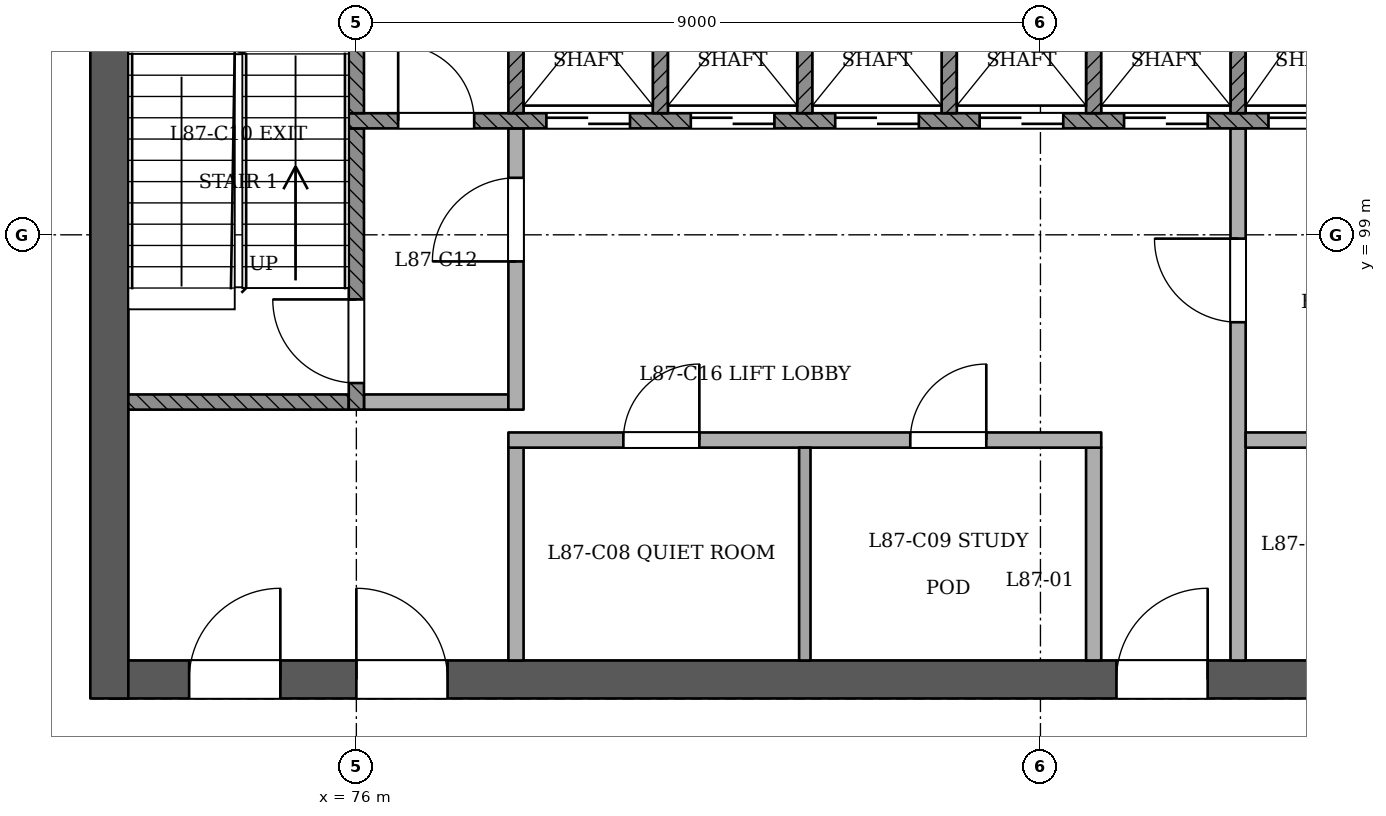
"""IFC4 building model, lengths in metres.
Left out: names, types, materials, properties, quantities, classifications, styles, units other than length and angle.
Written with IfcOpenShell. Run it as: python <this file> out.ifc"""

import sys

from ifc_helpers import new_model, si_unit, direction, frame, frame_2d, origin, place, context, subcontext, project, spatial, rectangle, extrude, element, fill, save


model = new_model("IFC4")
c1 = context("Model", 3, precision=1e-05, world=origin(), true_north=direction((0.0, 1.0)))
c2 = subcontext(c1, "Body", "Model", "MODEL_VIEW")
j1 = project(units=[si_unit("LENGTHUNIT", "METRE"), si_unit("PLANEANGLEUNIT", "RADIAN")], contexts=[c1])
p1 = place(None, origin())
s1 = spatial("IfcSite", under=j1, at=p1, CompositionType="ELEMENT")
p2 = place(p1, origin())
s2 = spatial("IfcBuilding", under=s1, at=p2, CompositionType="ELEMENT")
p3 = place(p2, frame((0.0, 0.0, 334.6)))
s3 = spatial("IfcBuildingStorey", under=s2, at=p3, CompositionType="ELEMENT", Elevation=334.6)
p4 = place(p3, frame((72.75, 93.15, 0.0), z_axis=(0.0, 0.0, 1.0), x_axis=(1.0, 0.0, 0.0)))
e1 = element("IfcWall", 1, at=p4, inside=s3, PredefinedType="SHEAR", context=c2, shape_type="SweptSolid", body=[
    extrude(rectangle(XDim=24.75, YDim=0.5, at=frame_2d((12.375, 0.0))), origin(), (0.0, 0.0, 1.0), 4.2),
])
p5 = place(p4, frame((1.05, 0.0, 0.0)))
e2 = element("IfcOpeningElement", 2, at=p5, cuts=e1, PredefinedType="OPENING", context=c2, shape_type="SweptSolid", body=[
    extrude(rectangle(XDim=1.2, YDim=2.1, at=frame_2d((0.6, 1.05))), frame((0.0, 0.26, 0.0), z_axis=(0.0, -1.0, 0.0), x_axis=(1.0, 0.0, 0.0)), (0.0, 0.0, 1.0), 0.521),
])
p6 = place(p4, frame((3.25, 0.0, 0.0)))
e3 = element("IfcOpeningElement", 3, at=p6, cuts=e1, PredefinedType="OPENING", context=c2, shape_type="SweptSolid", body=[
    extrude(rectangle(XDim=1.2, YDim=2.1, at=frame_2d((0.6, 1.05))), frame((0.0, 0.26, 0.0), z_axis=(0.0, -1.0, 0.0), x_axis=(1.0, 0.0, 0.0)), (0.0, 0.0, 1.0), 0.521),
])
p7 = place(p4, frame((13.25, 0.0, 0.0)))
e4 = element("IfcOpeningElement", 4, at=p7, cuts=e1, PredefinedType="OPENING", context=c2, shape_type="SweptSolid", body=[
    extrude(rectangle(XDim=1.2, YDim=2.1, at=frame_2d((0.6, 1.05))), frame((0.0, 0.26, 0.0), z_axis=(0.0, -1.0, 0.0), x_axis=(1.0, 0.0, 0.0)), (0.0, 0.0, 1.0), 0.521),
])
p8 = place(p4, frame((16.113, 0.0, 0.0)))
e5 = element("IfcOpeningElement", 5, at=p8, cuts=e1, PredefinedType="OPENING", context=c2, shape_type="SweptSolid", body=[
    extrude(rectangle(XDim=1.0, YDim=2.1, at=frame_2d((0.5, 1.05))), frame((0.0, 0.26, 0.0), z_axis=(0.0, -1.0, 0.0), x_axis=(1.0, 0.0, 0.0)), (0.0, 0.0, 1.0), 0.521),
])
p9 = place(p4, frame((19.55, 0.0, 0.0)))
e6 = element("IfcOpeningElement", 6, at=p9, cuts=e1, PredefinedType="OPENING", context=c2, shape_type="SweptSolid", body=[
    extrude(rectangle(XDim=1.0, YDim=2.1, at=frame_2d((0.5, 1.05))), frame((0.0, 0.26, 0.0), z_axis=(0.0, -1.0, 0.0), x_axis=(1.0, 0.0, 0.0)), (0.0, 0.0, 1.0), 0.521),
])
p10 = place(p4, frame((22.538, 0.0, 0.0)))
e7 = element("IfcOpeningElement", 7, at=p10, cuts=e1, PredefinedType="OPENING", context=c2, shape_type="SweptSolid", body=[
    extrude(rectangle(XDim=1.0, YDim=2.1, at=frame_2d((0.5, 1.05))), frame((0.0, 0.26, 0.0), z_axis=(0.0, -1.0, 0.0), x_axis=(1.0, 0.0, 0.0)), (0.0, 0.0, 1.0), 0.521),
])
p11 = place(p3, frame((72.75, 103.65, 0.0), z_axis=(0.0, 0.0, 1.0), x_axis=(0.0, -1.0, 0.0)))
e8 = element("IfcWall", 8, at=p11, inside=s3, PredefinedType="SHEAR", context=c2, shape_type="SweptSolid", body=[
    extrude(rectangle(XDim=10.75, YDim=0.5, at=frame_2d((5.375, 0.0))), origin(), (0.0, 0.0, 1.0), 4.2),
])
p12 = place(p3, frame((78.1, 93.4, 0.0), z_axis=(0.0, 0.0, 1.0), x_axis=(0.0, 1.0, 0.0)))
e9 = element("IfcWall", 9, at=p12, inside=s3, PredefinedType="PARTITIONING", context=c2, shape_type="SweptSolid", body=[
    extrude(rectangle(XDim=2.8, YDim=0.2, at=frame_2d((1.4, 0.0))), origin(), (0.0, 0.0, 1.0), 3.9),
])
p13 = place(p3, frame((81.9, 93.4, 0.0), z_axis=(0.0, 0.0, 1.0), x_axis=(0.0, 1.0, 0.0)))
e10 = element("IfcWall", 10, at=p13, inside=s3, PredefinedType="PARTITIONING", context=c2, shape_type="SweptSolid", body=[
    extrude(rectangle(XDim=2.8, YDim=0.15, at=frame_2d((1.4, 0.0))), origin(), (0.0, 0.0, 1.0), 3.9),
])
p14 = place(p3, frame((85.7, 93.4, 0.0), z_axis=(0.0, 0.0, 1.0), x_axis=(0.0, 1.0, 0.0)))
e11 = element("IfcWall", 11, at=p14, inside=s3, PredefinedType="PARTITIONING", context=c2, shape_type="SweptSolid", body=[
    extrude(rectangle(XDim=2.8, YDim=0.2, at=frame_2d((1.4, 0.0))), origin(), (0.0, 0.0, 1.0), 3.9),
])
p15 = place(p3, frame((87.6, 93.4, 0.0), z_axis=(0.0, 0.0, 1.0), x_axis=(0.0, 1.0, 0.0)))
e12 = element("IfcWall", 12, at=p15, inside=s3, PredefinedType="PARTITIONING", context=c2, shape_type="SweptSolid", body=[
    extrude(rectangle(XDim=7.0, YDim=0.2, at=frame_2d((3.5, 0.0))), origin(), (0.0, 0.0, 1.0), 3.9),
])
p16 = place(p15, frame((4.45, 0.0, 0.0)))
e13 = element("IfcOpeningElement", 13, at=p16, cuts=e12, PredefinedType="OPENING", context=c2, shape_type="SweptSolid", body=[
    extrude(rectangle(XDim=1.1, YDim=2.1, at=frame_2d((0.55, 1.05))), frame((0.0, 0.11, 0.0), z_axis=(0.0, -1.0, 0.0), x_axis=(1.0, 0.0, 0.0)), (0.0, 0.0, 1.0), 0.221),
])
p17 = place(p3, frame((78.0, 96.3, 0.0), z_axis=(0.0, 0.0, 1.0), x_axis=(1.0, 0.0, 0.0)))
e14 = element("IfcWall", 14, at=p17, inside=s3, PredefinedType="PARTITIONING", context=c2, shape_type="SweptSolid", body=[
    extrude(rectangle(XDim=7.8, YDim=0.2, at=frame_2d((3.9, 0.0))), origin(), (0.0, 0.0, 1.0), 3.9),
])
p18 = place(p17, frame((1.512, 0.0, 0.0)))
e15 = element("IfcOpeningElement", 15, at=p18, cuts=e14, PredefinedType="OPENING", context=c2, shape_type="SweptSolid", body=[
    extrude(rectangle(XDim=1.0, YDim=2.1, at=frame_2d((0.5, 1.05))), frame((0.0, 0.11, 0.0), z_axis=(0.0, -1.0, 0.0), x_axis=(1.0, 0.0, 0.0)), (0.0, 0.0, 1.0), 0.221),
])
p19 = place(p17, frame((5.288, 0.0, 0.0)))
e16 = element("IfcOpeningElement", 16, at=p19, cuts=e14, PredefinedType="OPENING", context=c2, shape_type="SweptSolid", body=[
    extrude(rectangle(XDim=1.0, YDim=2.1, at=frame_2d((0.5, 1.05))), frame((0.0, 0.11, 0.0), z_axis=(0.0, -1.0, 0.0), x_axis=(1.0, 0.0, 0.0)), (0.0, 0.0, 1.0), 0.221),
])
p20 = place(p3, frame((87.7, 96.3, 0.0), z_axis=(0.0, 0.0, 1.0), x_axis=(1.0, 0.0, 0.0)))
e17 = element("IfcWall", 17, at=p20, inside=s3, PredefinedType="PARTITIONING", context=c2, shape_type="SweptSolid", body=[
    extrude(rectangle(XDim=3.6, YDim=0.2, at=frame_2d((1.8, 0.0))), origin(), (0.0, 0.0, 1.0), 3.9),
])
p21 = place(p3, frame((73.0, 96.8, 0.0), z_axis=(0.0, 0.0, 1.0), x_axis=(1.0, 0.0, 0.0)))
e18 = element("IfcWall", 18, at=p21, inside=s3, PredefinedType="SOLIDWALL", context=c2, shape_type="SweptSolid", body=[
    extrude(rectangle(XDim=2.9, YDim=0.2, at=frame_2d((1.45, 0.0))), origin(), (0.0, 0.0, 1.0), 3.9),
])
p22 = place(p3, frame((76.0, 96.7, 0.0), z_axis=(0.0, 0.0, 1.0), x_axis=(0.0, 1.0, 0.0)))
e19 = element("IfcWall", 19, at=p22, inside=s3, PredefinedType="SOLIDWALL", context=c2, shape_type="SweptSolid", body=[
    extrude(rectangle(XDim=3.7, YDim=0.2, at=frame_2d((1.85, 0.0))), origin(), (0.0, 0.0, 1.0), 3.9),
])
p23 = place(p22, frame((0.35, 0.0, 0.0)))
e20 = element("IfcOpeningElement", 20, at=p23, cuts=e19, PredefinedType="OPENING", context=c2, shape_type="SweptSolid", body=[
    extrude(rectangle(XDim=1.1, YDim=2.1, at=frame_2d((0.55, 1.05))), frame((0.0, 0.11, 0.0), z_axis=(0.0, -1.0, 0.0), x_axis=(1.0, 0.0, 0.0)), (0.0, 0.0, 1.0), 0.221),
])
p24 = place(p3, frame((76.1, 96.8, 0.0), z_axis=(0.0, 0.0, 1.0), x_axis=(1.0, 0.0, 0.0)))
e21 = element("IfcWall", 21, at=p24, inside=s3, PredefinedType="PARTITIONING", context=c2, shape_type="SweptSolid", body=[
    extrude(rectangle(XDim=1.9, YDim=0.2, at=frame_2d((0.95, 0.0))), origin(), (0.0, 0.0, 1.0), 3.9),
])
p25 = place(p3, frame((78.1, 96.7, 0.0), z_axis=(0.0, 0.0, 1.0), x_axis=(0.0, 1.0, 0.0)))
e22 = element("IfcWall", 22, at=p25, inside=s3, PredefinedType="PARTITIONING", context=c2, shape_type="SweptSolid", body=[
    extrude(rectangle(XDim=3.7, YDim=0.2, at=frame_2d((1.85, 0.0))), origin(), (0.0, 0.0, 1.0), 3.9),
])
p26 = place(p25, frame((1.95, 0.0, 0.0)))
e23 = element("IfcOpeningElement", 23, at=p26, cuts=e22, PredefinedType="OPENING", context=c2, shape_type="SweptSolid", body=[
    extrude(rectangle(XDim=1.1, YDim=2.1, at=frame_2d((0.55, 1.05))), frame((0.0, 0.11, 0.0), z_axis=(0.0, -1.0, 0.0), x_axis=(1.0, 0.0, 0.0)), (0.0, 0.0, 1.0), 0.221),
])
p27 = place(p3, frame((75.9, 100.5, 0.0), z_axis=(0.0, 0.0, 1.0), x_axis=(1.0, 0.0, 0.0)))
e24 = element("IfcWall", 24, at=p27, inside=s3, PredefinedType="SOLIDWALL", context=c2, shape_type="SweptSolid", body=[
    extrude(rectangle(XDim=18.2, YDim=0.2, at=frame_2d((9.1, 0.0))), origin(), (0.0, 0.0, 1.0), 3.9),
])
p28 = place(p27, frame((2.6, 0.0, 0.0)))
e25 = element("IfcOpeningElement", 25, at=p28, cuts=e24, PredefinedType="OPENING", context=c2, shape_type="SweptSolid", body=[
    extrude(rectangle(XDim=1.1, YDim=2.1, at=frame_2d((0.55, 1.05))), frame((0.0, 0.11, 0.0), z_axis=(0.0, -1.0, 0.0), x_axis=(1.0, 0.0, 0.0)), (0.0, 0.0, 1.0), 0.221),
])
p29 = place(p27, frame((4.5, 0.0, 0.0)))
e26 = element("IfcOpeningElement", 26, at=p29, cuts=e24, PredefinedType="OPENING", context=c2, shape_type="SweptSolid", body=[
    extrude(rectangle(XDim=1.1, YDim=2.1, at=frame_2d((0.55, 1.05))), frame((0.0, 0.11, 0.0), z_axis=(0.0, -1.0, 0.0), x_axis=(1.0, 0.0, 0.0)), (0.0, 0.0, 1.0), 0.221),
])
p30 = place(p27, frame((6.4, 0.0, 0.0)))
e27 = element("IfcOpeningElement", 27, at=p30, cuts=e24, PredefinedType="OPENING", context=c2, shape_type="SweptSolid", body=[
    extrude(rectangle(XDim=1.1, YDim=2.1, at=frame_2d((0.55, 1.05))), frame((0.0, 0.11, 0.0), z_axis=(0.0, -1.0, 0.0), x_axis=(1.0, 0.0, 0.0)), (0.0, 0.0, 1.0), 0.221),
])
p31 = place(p27, frame((8.3, 0.0, 0.0)))
e28 = element("IfcOpeningElement", 28, at=p31, cuts=e24, PredefinedType="OPENING", context=c2, shape_type="SweptSolid", body=[
    extrude(rectangle(XDim=1.1, YDim=2.1, at=frame_2d((0.55, 1.05))), frame((0.0, 0.11, 0.0), z_axis=(0.0, -1.0, 0.0), x_axis=(1.0, 0.0, 0.0)), (0.0, 0.0, 1.0), 0.221),
])
p32 = place(p27, frame((10.2, 0.0, 0.0)))
e29 = element("IfcOpeningElement", 29, at=p32, cuts=e24, PredefinedType="OPENING", context=c2, shape_type="SweptSolid", body=[
    extrude(rectangle(XDim=1.1, YDim=2.1, at=frame_2d((0.55, 1.05))), frame((0.0, 0.11, 0.0), z_axis=(0.0, -1.0, 0.0), x_axis=(1.0, 0.0, 0.0)), (0.0, 0.0, 1.0), 0.221),
])
p33 = place(p27, frame((12.1, 0.0, 0.0)))
e30 = element("IfcOpeningElement", 30, at=p33, cuts=e24, PredefinedType="OPENING", context=c2, shape_type="SweptSolid", body=[
    extrude(rectangle(XDim=1.1, YDim=2.1, at=frame_2d((0.55, 1.05))), frame((0.0, 0.11, 0.0), z_axis=(0.0, -1.0, 0.0), x_axis=(1.0, 0.0, 0.0)), (0.0, 0.0, 1.0), 0.221),
])
p34 = place(p27, frame((14.0, 0.0, 0.0)))
e31 = element("IfcOpeningElement", 31, at=p34, cuts=e24, PredefinedType="OPENING", context=c2, shape_type="SweptSolid", body=[
    extrude(rectangle(XDim=1.1, YDim=2.1, at=frame_2d((0.55, 1.05))), frame((0.0, 0.11, 0.0), z_axis=(0.0, -1.0, 0.0), x_axis=(1.0, 0.0, 0.0)), (0.0, 0.0, 1.0), 0.221),
])
p35 = place(p27, frame((0.65, 0.0, 0.0)))
e32 = element("IfcOpeningElement", 32, at=p35, cuts=e24, PredefinedType="OPENING", context=c2, shape_type="SweptSolid", body=[
    extrude(rectangle(XDim=1.0, YDim=2.1, at=frame_2d((0.5, 1.05))), frame((0.0, 0.11, 0.0), z_axis=(0.0, -1.0, 0.0), x_axis=(1.0, 0.0, 0.0)), (0.0, 0.0, 1.0), 0.221),
])
p36 = place(p27, frame((16.3, 0.0, 0.0)))
e33 = element("IfcOpeningElement", 33, at=p36, cuts=e24, PredefinedType="OPENING", context=c2, shape_type="SweptSolid", body=[
    extrude(rectangle(XDim=1.0, YDim=2.1, at=frame_2d((0.5, 1.05))), frame((0.0, 0.11, 0.0), z_axis=(0.0, -1.0, 0.0), x_axis=(1.0, 0.0, 0.0)), (0.0, 0.0, 1.0), 0.221),
])
for number, where, z_axis, x_axis in (
    (34, (76.0, 100.6, 0.0), (0.0, 0.0, 1.0), (0.0, 1.0, 0.0)),
    (35, (78.1, 100.6, 0.0), (0.0, 0.0, 1.0), (0.0, 1.0, 0.0)),
    (36, (80.0, 100.6, 0.0), (0.0, 0.0, 1.0), (0.0, 1.0, 0.0)),
    (37, (81.9, 100.6, 0.0), (0.0, 0.0, 1.0), (0.0, 1.0, 0.0)),
    (38, (83.8, 100.6, 0.0), (0.0, 0.0, 1.0), (0.0, 1.0, 0.0)),
    (39, (85.7, 100.6, 0.0), (0.0, 0.0, 1.0), (0.0, 1.0, 0.0)),
    (40, (87.6, 100.6, 0.0), (0.0, 0.0, 1.0), (0.0, 1.0, 0.0)),
):
    element("IfcWall", number, at=place(p3, frame(where, z_axis=z_axis, x_axis=x_axis)), inside=s3, PredefinedType="SOLIDWALL", context=c2, shape_type="SweptSolid", body=[
        extrude(rectangle(XDim=2.8, YDim=0.2, at=frame_2d((1.4, 0.0))), origin(), (0.0, 0.0, 1.0), 3.9),
    ])
p37 = place(p28, origin())
e41 = element("IfcDoor", 41, at=p37, inside=s3, OperationType="SLIDING_TO_RIGHT", PredefinedType="NOTDEFINED", context=c2, shape_type="SweptSolid", body=[
    extrude(rectangle(XDim=1.1, YDim=2.1, at=frame_2d((0.55, 1.05))), frame((0.0, 0.025, 0.0), z_axis=(0.0, -1.0, 0.0), x_axis=(1.0, 0.0, 0.0)), (0.0, 0.0, 1.0), 0.05),
])
fill(e25, e41)
p38 = place(p29, origin())
e42 = element("IfcDoor", 42, at=p38, inside=s3, OperationType="SLIDING_TO_LEFT", PredefinedType="NOTDEFINED", context=c2, shape_type="SweptSolid", body=[
    extrude(rectangle(XDim=1.1, YDim=2.1, at=frame_2d((0.55, 1.05))), frame((0.0, 0.025, 0.0), z_axis=(0.0, -1.0, 0.0), x_axis=(1.0, 0.0, 0.0)), (0.0, 0.0, 1.0), 0.05),
])
fill(e26, e42)
p39 = place(p30, origin())
e43 = element("IfcDoor", 43, at=p39, inside=s3, OperationType="SLIDING_TO_RIGHT", PredefinedType="NOTDEFINED", context=c2, shape_type="SweptSolid", body=[
    extrude(rectangle(XDim=1.1, YDim=2.1, at=frame_2d((0.55, 1.05))), frame((0.0, 0.025, 0.0), z_axis=(0.0, -1.0, 0.0), x_axis=(1.0, 0.0, 0.0)), (0.0, 0.0, 1.0), 0.05),
])
fill(e27, e43)
p40 = place(p31, origin())
e44 = element("IfcDoor", 44, at=p40, inside=s3, OperationType="SLIDING_TO_LEFT", PredefinedType="NOTDEFINED", context=c2, shape_type="SweptSolid", body=[
    extrude(rectangle(XDim=1.1, YDim=2.1, at=frame_2d((0.55, 1.05))), frame((0.0, 0.025, 0.0), z_axis=(0.0, -1.0, 0.0), x_axis=(1.0, 0.0, 0.0)), (0.0, 0.0, 1.0), 0.05),
])
fill(e28, e44)
p41 = place(p32, origin())
e45 = element("IfcDoor", 45, at=p41, inside=s3, OperationType="SLIDING_TO_RIGHT", PredefinedType="NOTDEFINED", context=c2, shape_type="SweptSolid", body=[
    extrude(rectangle(XDim=1.1, YDim=2.1, at=frame_2d((0.55, 1.05))), frame((0.0, 0.025, 0.0), z_axis=(0.0, -1.0, 0.0), x_axis=(1.0, 0.0, 0.0)), (0.0, 0.0, 1.0), 0.05),
])
fill(e29, e45)
p42 = place(p33, origin())
e46 = element("IfcDoor", 46, at=p42, inside=s3, OperationType="SLIDING_TO_RIGHT", PredefinedType="NOTDEFINED", context=c2, shape_type="SweptSolid", body=[
    extrude(rectangle(XDim=1.1, YDim=2.1, at=frame_2d((0.55, 1.05))), frame((0.0, 0.025, 0.0), z_axis=(0.0, -1.0, 0.0), x_axis=(1.0, 0.0, 0.0)), (0.0, 0.0, 1.0), 0.05),
])
fill(e30, e46)
p43 = place(p23, origin())
e47 = element("IfcDoor", 47, at=p43, inside=s3, OperationType="SINGLE_SWING_RIGHT", PredefinedType="NOTDEFINED", context=c2, shape_type="SweptSolid", body=[
    extrude(rectangle(XDim=1.1, YDim=2.1, at=frame_2d((0.55, 1.05))), frame((0.0, 0.025, 0.0), z_axis=(0.0, -1.0, 0.0), x_axis=(1.0, 0.0, 0.0)), (0.0, 0.0, 1.0), 0.05),
])
fill(e20, e47)
p44 = place(p26, origin())
e48 = element("IfcDoor", 48, at=p44, inside=s3, OperationType="SINGLE_SWING_LEFT", PredefinedType="NOTDEFINED", context=c2, shape_type="SweptSolid", body=[
    extrude(rectangle(XDim=1.1, YDim=2.1, at=frame_2d((0.55, 1.05))), frame((0.0, 0.025, 0.0), z_axis=(0.0, -1.0, 0.0), x_axis=(1.0, 0.0, 0.0)), (0.0, 0.0, 1.0), 0.05),
])
fill(e23, e48)
p45 = place(p16, origin())
e49 = element("IfcDoor", 49, at=p45, inside=s3, OperationType="SINGLE_SWING_RIGHT", PredefinedType="NOTDEFINED", context=c2, shape_type="SweptSolid", body=[
    extrude(rectangle(XDim=1.1, YDim=2.1, at=frame_2d((0.55, 1.05))), frame((0.0, 0.025, 0.0), z_axis=(0.0, -1.0, 0.0), x_axis=(1.0, 0.0, 0.0)), (0.0, 0.0, 1.0), 0.05),
])
fill(e13, e49)
p46 = place(p5, origin())
e50 = element("IfcDoor", 50, at=p46, inside=s3, OperationType="SINGLE_SWING_RIGHT", PredefinedType="NOTDEFINED", context=c2, shape_type="SweptSolid", body=[
    extrude(rectangle(XDim=1.2, YDim=2.1, at=frame_2d((0.6, 1.05))), frame((0.0, 0.025, 0.0), z_axis=(0.0, -1.0, 0.0), x_axis=(1.0, 0.0, 0.0)), (0.0, 0.0, 1.0), 0.05),
])
fill(e2, e50)
p47 = place(p6, origin())
e51 = element("IfcDoor", 51, at=p47, inside=s3, OperationType="SINGLE_SWING_LEFT", PredefinedType="NOTDEFINED", context=c2, shape_type="SweptSolid", body=[
    extrude(rectangle(XDim=1.2, YDim=2.1, at=frame_2d((0.6, 1.05))), frame((0.0, 0.025, 0.0), z_axis=(0.0, -1.0, 0.0), x_axis=(1.0, 0.0, 0.0)), (0.0, 0.0, 1.0), 0.05),
])
fill(e3, e51)
p48 = place(p7, origin())
e52 = element("IfcDoor", 52, at=p48, inside=s3, OperationType="SINGLE_SWING_RIGHT", PredefinedType="NOTDEFINED", context=c2, shape_type="SweptSolid", body=[
    extrude(rectangle(XDim=1.2, YDim=2.1, at=frame_2d((0.6, 1.05))), frame((0.0, 0.025, 0.0), z_axis=(0.0, -1.0, 0.0), x_axis=(1.0, 0.0, 0.0)), (0.0, 0.0, 1.0), 0.05),
])
fill(e4, e52)
p49 = place(p35, origin())
e53 = element("IfcDoor", 53, at=p49, inside=s3, OperationType="SINGLE_SWING_LEFT", PredefinedType="NOTDEFINED", context=c2, shape_type="SweptSolid", body=[
    extrude(rectangle(XDim=1.0, YDim=2.1, at=frame_2d((0.5, 1.05))), frame((0.0, 0.025, 0.0), z_axis=(0.0, -1.0, 0.0), x_axis=(1.0, 0.0, 0.0)), (0.0, 0.0, 1.0), 0.05),
])
fill(e32, e53)
p50 = place(p18, origin())
e54 = element("IfcDoor", 54, at=p50, inside=s3, OperationType="SINGLE_SWING_RIGHT", PredefinedType="NOTDEFINED", context=c2, shape_type="SweptSolid", body=[
    extrude(rectangle(XDim=1.0, YDim=2.1, at=frame_2d((0.5, 1.05))), frame((0.0, 0.025, 0.0), z_axis=(0.0, -1.0, 0.0), x_axis=(1.0, 0.0, 0.0)), (0.0, 0.0, 1.0), 0.05),
])
fill(e15, e54)
p51 = place(p19, origin())
e55 = element("IfcDoor", 55, at=p51, inside=s3, OperationType="SINGLE_SWING_RIGHT", PredefinedType="NOTDEFINED", context=c2, shape_type="SweptSolid", body=[
    extrude(rectangle(XDim=1.0, YDim=2.1, at=frame_2d((0.5, 1.05))), frame((0.0, 0.025, 0.0), z_axis=(0.0, -1.0, 0.0), x_axis=(1.0, 0.0, 0.0)), (0.0, 0.0, 1.0), 0.05),
])
fill(e16, e55)
save(model, sys.argv[1])
